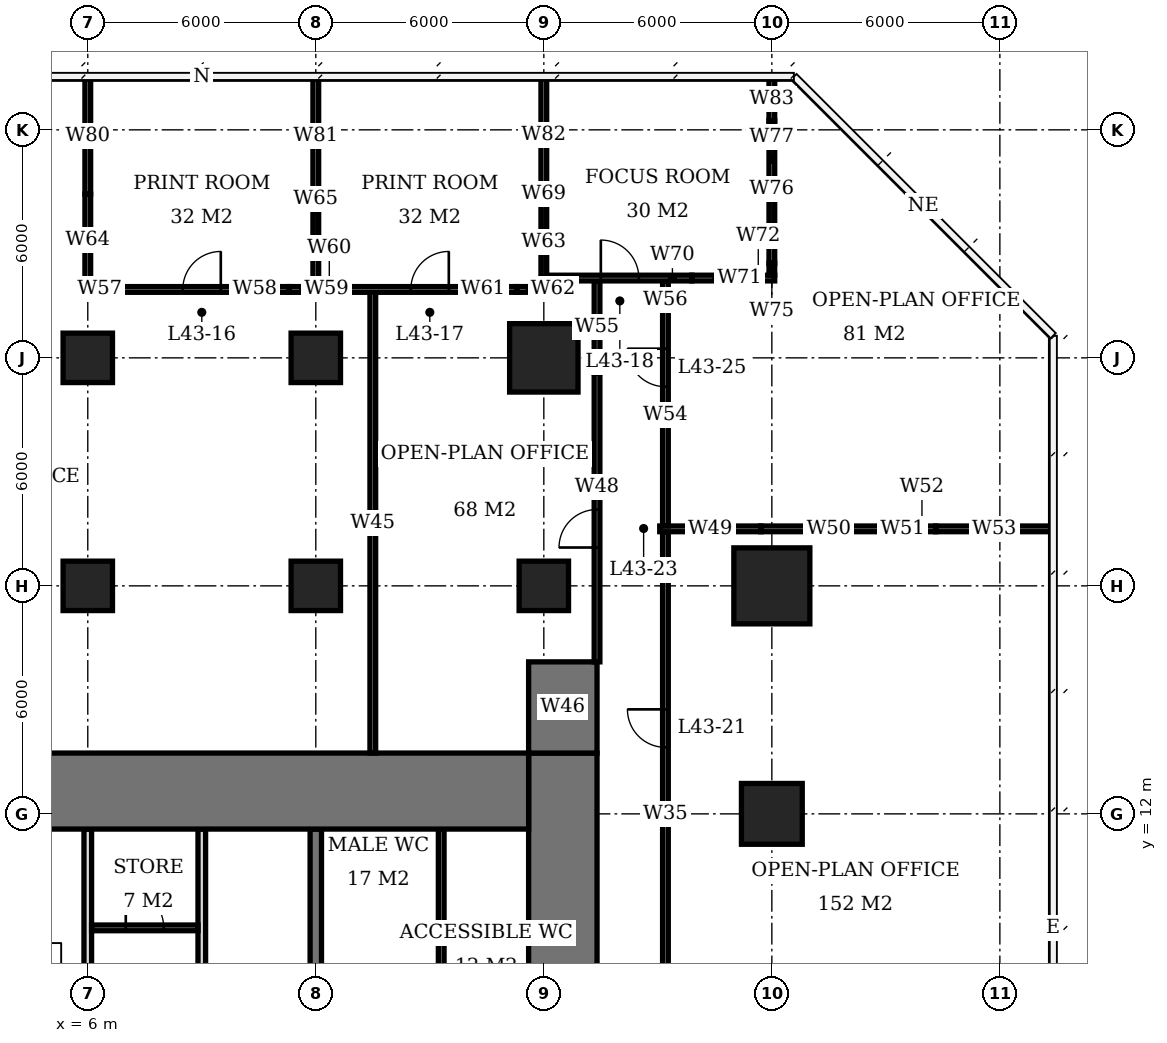
"""IFC4 building model, lengths in metres.
Left out: names, types, materials, properties, quantities, classifications, styles, units other than length and angle.
Written with IfcOpenShell. Run it as: python <this file> out.ifc"""

import sys

from ifc_helpers import new_model, si_unit, direction, frame, frame_2d, origin, origin_2d, place, context, subcontext, project, spatial, rectangle, extrude, element, fill, save


model = new_model("IFC4")
c1 = context("Model", 3, precision=1e-05, world=origin(), true_north=direction((0.0, 1.0)))
c2 = subcontext(c1, "Body", "Model", "MODEL_VIEW")
j1 = project(units=[si_unit("LENGTHUNIT", "METRE"), si_unit("PLANEANGLEUNIT", "RADIAN")], contexts=[c1])
p1 = place(None, origin())
s1 = spatial("IfcSite", under=j1, at=p1, CompositionType="ELEMENT")
p2 = place(p1, origin())
s2 = spatial("IfcBuilding", under=s1, at=p2, CompositionType="ELEMENT")
p3 = place(p2, frame((0.0, 0.0, 177.2)))
s3 = spatial("IfcBuildingStorey", under=s2, at=p3, CompositionType="ELEMENT", Elevation=177.2)
for number, where, z_axis, x_axis in (
    (1, (6.0, 18.0, 0.0), (0.0, 0.0, 1.0), (1.0, 0.0, 0.0)),
    (2, (6.0, 24.0, 0.0), (0.0, 0.0, 1.0), (1.0, 0.0, 0.0)),
    (3, (12.0, 18.0, 0.0), (0.0, 0.0, 1.0), (1.0, 0.0, 0.0)),
    (4, (12.0, 24.0, 0.0), (0.0, 0.0, 1.0), (1.0, 0.0, 0.0)),
    (5, (18.0, 18.0, 0.0), (0.0, 0.0, 1.0), (1.0, 0.0, 0.0)),
):
    element("IfcColumn", number, at=place(p3, frame(where, z_axis=z_axis, x_axis=x_axis)), inside=s3, PredefinedType="COLUMN", context=c2, shape_type="SweptSolid", body=[
        extrude(rectangle(XDim=1.3, YDim=1.3, at=origin_2d()), origin(), (0.0, 0.0, 1.0), 3.9),
    ])
p4 = place(p3, frame((18.0, 24.0, 0.0), z_axis=(0.0, 0.0, 1.0), x_axis=(1.0, 0.0, 0.0)))
e6 = element("IfcColumn", 6, at=p4, inside=s3, PredefinedType="COLUMN", context=c2, shape_type="SweptSolid", body=[
    extrude(rectangle(XDim=1.8, YDim=1.8, at=origin_2d()), origin(), (0.0, 0.0, 1.0), 3.9),
])
p5 = place(p3, frame((24.0, 12.0, 0.0), z_axis=(0.0, 0.0, 1.0), x_axis=(1.0, 0.0, 0.0)))
e7 = element("IfcColumn", 7, at=p5, inside=s3, PredefinedType="COLUMN", context=c2, shape_type="SweptSolid", body=[
    extrude(rectangle(XDim=1.6, YDim=1.6, at=origin_2d()), origin(), (0.0, 0.0, 1.0), 3.9),
])
p6 = place(p3, frame((24.0, 18.0, 0.0), z_axis=(0.0, 0.0, 1.0), x_axis=(1.0, 0.0, 0.0)))
e8 = element("IfcColumn", 8, at=p6, inside=s3, PredefinedType="COLUMN", context=c2, shape_type="SweptSolid", body=[
    extrude(rectangle(XDim=2.0, YDim=2.0, at=origin_2d()), origin(), (0.0, 0.0, 1.0), 3.9),
])
p7 = place(p3, frame((-5.6, 12.6, 0.0), z_axis=(0.0, 0.0, 1.0), x_axis=(1.0, 0.0, 0.0)))
e9 = element("IfcWall", 9, at=p7, inside=s3, PredefinedType="SHEAR", context=c2, shape_type="SweptSolid", body=[
    extrude(rectangle(XDim=23.2, YDim=2.0, at=frame_2d((11.6, 0.0))), origin(), (0.0, 0.0, 1.0), 3.9),
])
p8 = place(p3, frame((18.5, -7.6, 0.0), z_axis=(0.0, 0.0, 1.0), x_axis=(0.0, 1.0, 0.0)))
e10 = element("IfcWall", 10, at=p8, inside=s3, PredefinedType="SHEAR", context=c2, shape_type="SweptSolid", body=[
    extrude(rectangle(XDim=21.2, YDim=1.8, at=frame_2d((10.6, 0.0))), origin(), (0.0, 0.0, 1.0), 3.9),
])
p9 = place(p8, frame((9.2, 0.0, 0.0)))
e11 = element("IfcOpeningElement", 11, at=p9, cuts=e10, PredefinedType="OPENING", context=c2, shape_type="SweptSolid", body=[
    extrude(rectangle(XDim=1.8, YDim=2.4, at=frame_2d((0.9, 1.2))), frame((0.0, 0.91, 0.0), z_axis=(0.0, -1.0, 0.0), x_axis=(1.0, 0.0, 0.0)), (0.0, 0.0, 1.0), 1.82),
])
p10 = place(p3, frame((18.5, 13.6, 0.0), z_axis=(0.0, 0.0, 1.0), x_axis=(0.0, 1.0, 0.0)))
e12 = element("IfcWall", 12, at=p10, inside=s3, PredefinedType="SHEAR", context=c2, shape_type="SweptSolid", body=[
    extrude(rectangle(XDim=2.4, YDim=1.8, at=frame_2d((1.2, 0.0))), origin(), (0.0, 0.0, 1.0), 3.9),
])
p11 = place(p3, frame((12.0, 6.15, 0.0), z_axis=(0.0, 0.0, 1.0), x_axis=(0.0, 1.0, 0.0)))
e13 = element("IfcWall", 13, at=p11, inside=s3, PredefinedType="SHEAR", context=c2, shape_type="SweptSolid", body=[
    extrude(rectangle(XDim=5.45, YDim=0.3, at=frame_2d((2.725, 0.0))), origin(), (0.0, 0.0, 1.0), 3.9),
])
for number, where, z_axis, x_axis in (
    (14, (6.0, 6.15, 0.0), (0.0, 0.0, 1.0), (0.0, 1.0, 0.0)),
    (15, (9.0, 6.15, 0.0), (0.0, 0.0, 1.0), (0.0, 1.0, 0.0)),
):
    element("IfcWall", number, at=place(p3, frame(where, z_axis=z_axis, x_axis=x_axis)), inside=s3, PredefinedType="SOLIDWALL", context=c2, shape_type="SweptSolid", body=[
        extrude(rectangle(XDim=5.45, YDim=0.2, at=frame_2d((2.725, 0.0))), origin(), (0.0, 0.0, 1.0), 3.9),
    ])
p12 = place(p3, frame((15.3, 6.15, 0.0), z_axis=(0.0, 0.0, 1.0), x_axis=(0.0, 1.0, 0.0)))
e16 = element("IfcWall", 16, at=p12, inside=s3, PredefinedType="PLUMBINGWALL", context=c2, shape_type="SweptSolid", body=[
    extrude(rectangle(XDim=5.45, YDim=0.15, at=frame_2d((2.725, 0.0))), origin(), (0.0, 0.0, 1.0), 3.65),
])
p13 = place(p3, frame((6.1, 9.0, 0.0), z_axis=(0.0, 0.0, 1.0), x_axis=(1.0, 0.0, 0.0)))
e17 = element("IfcWall", 17, at=p13, inside=s3, PredefinedType="PARTITIONING", context=c2, shape_type="SweptSolid", body=[
    extrude(rectangle(XDim=2.8, YDim=0.15, at=frame_2d((1.4, 0.0))), origin(), (0.0, 0.0, 1.0), 3.65),
])
p14 = place(p13, frame((0.9, 0.0, 0.0)))
e18 = element("IfcOpeningElement", 18, at=p14, cuts=e17, PredefinedType="OPENING", context=c2, shape_type="SweptSolid", body=[
    extrude(rectangle(XDim=1.0, YDim=2.1, at=frame_2d((0.5, 1.05))), frame((0.0, 0.085, 0.0), z_axis=(0.0, -1.0, 0.0), x_axis=(1.0, 0.0, 0.0)), (0.0, 0.0, 1.0), 0.17),
])
p15 = place(p3, frame((5.925, 25.8, 0.0), z_axis=(0.0, 0.0, 1.0), x_axis=(1.0, 0.0, 0.0)))
e19 = element("IfcWall", 19, at=p15, inside=s3, PredefinedType="PARTITIONING", context=c2, shape_type="SweptSolid", body=[
    extrude(rectangle(XDim=0.785, YDim=0.15, at=frame_2d((0.393, 0.0))), origin(), (0.0, 0.0, 1.0), 2.65),
])
p16 = place(p3, frame((6.71, 25.8, 0.0), z_axis=(0.0, 0.0, 1.0), x_axis=(1.0, 0.0, 0.0)))
e20 = element("IfcWall", 20, at=p16, inside=s3, PredefinedType="PARTITIONING", context=c2, shape_type="SweptSolid", body=[
    extrude(rectangle(XDim=4.58, YDim=0.15, at=frame_2d((2.29, 0.0))), origin(), (0.0, 0.0, 1.0), 3.65),
])
p17 = place(p16, frame((1.79, 0.0, 0.0)))
e21 = element("IfcOpeningElement", 21, at=p17, cuts=e20, PredefinedType="OPENING", context=c2, shape_type="SweptSolid", body=[
    extrude(rectangle(XDim=1.0, YDim=2.1, at=frame_2d((0.5, 1.05))), frame((0.0, 0.085, 0.0), z_axis=(0.0, -1.0, 0.0), x_axis=(1.0, 0.0, 0.0)), (0.0, 0.0, 1.0), 0.17),
])
p18 = place(p3, frame((11.29, 25.8, 0.0), z_axis=(0.0, 0.0, 1.0), x_axis=(1.0, 0.0, 0.0)))
e22 = element("IfcWall", 22, at=p18, inside=s3, PredefinedType="PARTITIONING", context=c2, shape_type="SweptSolid", body=[
    extrude(rectangle(XDim=0.785, YDim=0.15, at=frame_2d((0.393, 0.0))), origin(), (0.0, 0.0, 1.0), 2.65),
])
p19 = place(p3, frame((12.0, 25.8, 0.0), z_axis=(0.0, 0.0, 1.0), x_axis=(1.0, 0.0, 0.0)))
e23 = element("IfcWall", 23, at=p19, inside=s3, PredefinedType="PARTITIONING", context=c2, shape_type="SweptSolid", body=[
    extrude(rectangle(XDim=0.71, YDim=0.15, at=frame_2d((0.355, 0.0))), origin(), (0.0, 0.0, 1.0), 2.65),
])
p20 = place(p3, frame((12.71, 25.8, 0.0), z_axis=(0.0, 0.0, 1.0), x_axis=(1.0, 0.0, 0.0)))
e24 = element("IfcWall", 24, at=p20, inside=s3, PredefinedType="PARTITIONING", context=c2, shape_type="SweptSolid", body=[
    extrude(rectangle(XDim=4.58, YDim=0.15, at=frame_2d((2.29, 0.0))), origin(), (0.0, 0.0, 1.0), 3.65),
])
p21 = place(p20, frame((1.79, 0.0, 0.0)))
e25 = element("IfcOpeningElement", 25, at=p21, cuts=e24, PredefinedType="OPENING", context=c2, shape_type="SweptSolid", body=[
    extrude(rectangle(XDim=1.0, YDim=2.1, at=frame_2d((0.5, 1.05))), frame((0.0, 0.085, 0.0), z_axis=(0.0, -1.0, 0.0), x_axis=(1.0, 0.0, 0.0)), (0.0, 0.0, 1.0), 0.17),
])
p22 = place(p3, frame((17.29, 25.8, 0.0), z_axis=(0.0, 0.0, 1.0), x_axis=(1.0, 0.0, 0.0)))
e26 = element("IfcWall", 26, at=p22, inside=s3, PredefinedType="PARTITIONING", context=c2, shape_type="SweptSolid", body=[
    extrude(rectangle(XDim=0.71, YDim=0.15, at=frame_2d((0.355, 0.0))), origin(), (0.0, 0.0, 1.0), 2.65),
])
p23 = place(p3, frame((18.075, 26.1, 0.0), z_axis=(0.0, 0.0, 1.0), x_axis=(1.0, 0.0, 0.0)))
e27 = element("IfcWall", 27, at=p23, inside=s3, PredefinedType="PARTITIONING", context=c2, shape_type="SweptSolid", body=[
    extrude(rectangle(XDim=3.817, YDim=0.15, at=frame_2d((1.909, 0.0))), origin(), (0.0, 0.0, 1.0), 2.65),
])
p24 = place(p23, frame((1.425, 0.0, 0.0)))
e28 = element("IfcOpeningElement", 28, at=p24, cuts=e27, PredefinedType="OPENING", context=c2, shape_type="SweptSolid", body=[
    extrude(rectangle(XDim=1.0, YDim=2.1, at=frame_2d((0.5, 1.05))), frame((0.0, 0.085, 0.0), z_axis=(0.0, -1.0, 0.0), x_axis=(1.0, 0.0, 0.0)), (0.0, 0.0, 1.0), 0.17),
])
p25 = place(p3, frame((21.892, 26.1, 0.0), z_axis=(0.0, 0.0, 1.0), x_axis=(1.0, 0.0, 0.0)))
e29 = element("IfcWall", 29, at=p25, inside=s3, PredefinedType="PARTITIONING", context=c2, shape_type="SweptSolid", body=[
    extrude(rectangle(XDim=1.318, YDim=0.15, at=frame_2d((0.659, 0.0))), origin(), (0.0, 0.0, 1.0), 3.65),
])
p26 = place(p3, frame((23.21, 26.1, 0.0), z_axis=(0.0, 0.0, 1.0), x_axis=(1.0, 0.0, 0.0)))
e30 = element("IfcWall", 30, at=p26, inside=s3, PredefinedType="PARTITIONING", context=c2, shape_type="SweptSolid", body=[
    extrude(rectangle(XDim=0.865, YDim=0.15, at=frame_2d((0.433, 0.0))), origin(), (0.0, 0.0, 1.0), 2.65),
])
p27 = place(p3, frame((6.0, 25.875, 0.0), z_axis=(0.0, 0.0, 1.0), x_axis=(0.0, 1.0, 0.0)))
e31 = element("IfcWall", 31, at=p27, inside=s3, PredefinedType="PARTITIONING", context=c2, shape_type="SweptSolid", body=[
    extrude(rectangle(XDim=2.435, YDim=0.15, at=frame_2d((1.218, 0.0))), origin(), (0.0, 0.0, 1.0), 2.65),
])
p28 = place(p3, frame((6.0, 28.31, 0.0), z_axis=(0.0, 0.0, 1.0), x_axis=(0.0, 1.0, 0.0)))
e32 = element("IfcWall", 32, at=p28, inside=s3, PredefinedType="PARTITIONING", context=c2, shape_type="SweptSolid", body=[
    extrude(rectangle(XDim=3.04, YDim=0.15, at=frame_2d((1.52, 0.0))), origin(), (0.0, 0.0, 1.0), 3.65),
])
p29 = place(p3, frame((12.0, 25.875, 0.0), z_axis=(0.0, 0.0, 1.0), x_axis=(0.0, 1.0, 0.0)))
e33 = element("IfcWall", 33, at=p29, inside=s3, PredefinedType="PARTITIONING", context=c2, shape_type="SweptSolid", body=[
    extrude(rectangle(XDim=2.435, YDim=0.15, at=frame_2d((1.218, 0.0))), origin(), (0.0, 0.0, 1.0), 2.65),
])
p30 = place(p3, frame((12.0, 28.31, 0.0), z_axis=(0.0, 0.0, 1.0), x_axis=(0.0, 1.0, 0.0)))
e34 = element("IfcWall", 34, at=p30, inside=s3, PredefinedType="PARTITIONING", context=c2, shape_type="SweptSolid", body=[
    extrude(rectangle(XDim=3.04, YDim=0.15, at=frame_2d((1.52, 0.0))), origin(), (0.0, 0.0, 1.0), 3.65),
])
p31 = place(p3, frame((18.0, 25.8, 0.0), z_axis=(0.0, 0.0, 1.0), x_axis=(0.0, 1.0, 0.0)))
e35 = element("IfcWall", 35, at=p31, inside=s3, PredefinedType="PARTITIONING", context=c2, shape_type="SweptSolid", body=[
    extrude(rectangle(XDim=0.3, YDim=0.15, at=frame_2d((0.15, 0.0))), origin(), (0.0, 0.0, 1.0), 2.65),
])
p32 = place(p3, frame((18.0, 26.1, 0.0), z_axis=(0.0, 0.0, 1.0), x_axis=(0.0, 1.0, 0.0)))
e36 = element("IfcWall", 36, at=p32, inside=s3, PredefinedType="PARTITIONING", context=c2, shape_type="SweptSolid", body=[
    extrude(rectangle(XDim=2.21, YDim=0.15, at=frame_2d((1.105, 0.0))), origin(), (0.0, 0.0, 1.0), 2.65),
])
p33 = place(p3, frame((18.0, 28.31, 0.0), z_axis=(0.0, 0.0, 1.0), x_axis=(0.0, 1.0, 0.0)))
e37 = element("IfcWall", 37, at=p33, inside=s3, PredefinedType="PARTITIONING", context=c2, shape_type="SweptSolid", body=[
    extrude(rectangle(XDim=3.09, YDim=0.15, at=frame_2d((1.545, 0.0))), origin(), (0.0, 0.0, 1.0), 3.65),
])
p34 = place(p3, frame((24.0, 26.175, 0.0), z_axis=(0.0, 0.0, 1.0), x_axis=(0.0, 1.0, 0.0)))
e38 = element("IfcWall", 38, at=p34, inside=s3, PredefinedType="PARTITIONING", context=c2, shape_type="SweptSolid", body=[
    extrude(rectangle(XDim=0.315, YDim=0.15, at=frame_2d((0.157, 0.0))), origin(), (0.0, 0.0, 1.0), 2.65),
])
p35 = place(p3, frame((24.0, 26.49, 0.0), z_axis=(0.0, 0.0, 1.0), x_axis=(0.0, 1.0, 0.0)))
e39 = element("IfcWall", 39, at=p35, inside=s3, PredefinedType="PARTITIONING", context=c2, shape_type="SweptSolid", body=[
    extrude(rectangle(XDim=1.718, YDim=0.15, at=frame_2d((0.859, 0.0))), origin(), (0.0, 0.0, 1.0), 3.65),
])
p36 = place(p3, frame((24.0, 28.208, 0.0), z_axis=(0.0, 0.0, 1.0), x_axis=(0.0, 1.0, 0.0)))
e40 = element("IfcWall", 40, at=p36, inside=s3, PredefinedType="PARTITIONING", context=c2, shape_type="SweptSolid", body=[
    extrude(rectangle(XDim=2.029, YDim=0.15, at=frame_2d((1.015, 0.0))), origin(), (0.0, 0.0, 1.0), 2.65),
])
p37 = place(p3, frame((24.0, 30.237, 0.0), z_axis=(0.0, 0.0, 1.0), x_axis=(0.0, 1.0, 0.0)))
e41 = element("IfcWall", 41, at=p37, inside=s3, PredefinedType="PARTITIONING", context=c2, shape_type="SweptSolid", body=[
    extrude(rectangle(XDim=1.163, YDim=0.15, at=frame_2d((0.582, 0.0))), origin(), (0.0, 0.0, 1.0), 3.65),
])
p38 = place(p3, frame((13.5, 13.6, 0.0), z_axis=(0.0, 0.0, 1.0), x_axis=(0.0, 1.0, 0.0)))
e42 = element("IfcWall", 42, at=p38, inside=s3, PredefinedType="PARTITIONING", context=c2, shape_type="SweptSolid", body=[
    extrude(rectangle(XDim=12.125, YDim=0.15, at=frame_2d((6.062, 0.0))), origin(), (0.0, 0.0, 1.0), 3.65),
])
p39 = place(p3, frame((19.4, 16.0, 0.0), z_axis=(0.0, 0.0, 1.0), x_axis=(0.0, 1.0, 0.0)))
e43 = element("IfcWall", 43, at=p39, inside=s3, PredefinedType="PARTITIONING", context=c2, shape_type="SweptSolid", body=[
    extrude(rectangle(XDim=7.608, YDim=0.15, at=frame_2d((3.804, 0.0))), origin(), (0.0, 0.0, 1.0), 3.65),
])
p40 = place(p39, frame((3.009, 0.0, 0.0)))
e44 = element("IfcOpeningElement", 44, at=p40, cuts=e43, PredefinedType="OPENING", context=c2, shape_type="SweptSolid", body=[
    extrude(rectangle(XDim=1.0, YDim=2.1, at=frame_2d((0.5, 1.05))), frame((0.0, 0.085, 0.0), z_axis=(0.0, -1.0, 0.0), x_axis=(1.0, 0.0, 0.0)), (0.0, 0.0, 1.0), 0.17),
])
p41 = place(p3, frame((19.4, 23.608, 0.0), z_axis=(0.0, 0.0, 1.0), x_axis=(0.0, 1.0, 0.0)))
e45 = element("IfcWall", 45, at=p41, inside=s3, PredefinedType="PARTITIONING", context=c2, shape_type="SweptSolid", body=[
    extrude(rectangle(XDim=2.417, YDim=0.15, at=frame_2d((1.208, 0.0))), origin(), (0.0, 0.0, 1.0), 2.65),
])
p42 = place(p3, frame((21.2, 4.575, 0.0), z_axis=(0.0, 0.0, 1.0), x_axis=(0.0, 1.0, 0.0)))
e46 = element("IfcWall", 46, at=p42, inside=s3, PredefinedType="PARTITIONING", context=c2, shape_type="SweptSolid", body=[
    extrude(rectangle(XDim=14.85, YDim=0.15, at=frame_2d((7.425, 0.0))), origin(), (0.0, 0.0, 1.0), 3.65),
])
p43 = place(p42, frame((9.175, 0.0, 0.0)))
e47 = element("IfcOpeningElement", 47, at=p43, cuts=e46, PredefinedType="OPENING", context=c2, shape_type="SweptSolid", body=[
    extrude(rectangle(XDim=1.0, YDim=2.1, at=frame_2d((0.5, 1.05))), frame((0.0, 0.085, 0.0), z_axis=(0.0, -1.0, 0.0), x_axis=(1.0, 0.0, 0.0)), (0.0, 0.0, 1.0), 0.17),
])
p44 = place(p3, frame((21.2, 19.575, 0.0), z_axis=(0.0, 0.0, 1.0), x_axis=(0.0, 1.0, 0.0)))
e48 = element("IfcWall", 48, at=p44, inside=s3, PredefinedType="PARTITIONING", context=c2, shape_type="SweptSolid", body=[
    extrude(rectangle(XDim=5.833, YDim=0.15, at=frame_2d((2.917, 0.0))), origin(), (0.0, 0.0, 1.0), 3.65),
])
p45 = place(p44, frame((3.666, 0.0, 0.0)))
e49 = element("IfcOpeningElement", 49, at=p45, cuts=e48, PredefinedType="OPENING", context=c2, shape_type="SweptSolid", body=[
    extrude(rectangle(XDim=1.0, YDim=2.1, at=frame_2d((0.5, 1.05))), frame((0.0, 0.085, 0.0), z_axis=(0.0, -1.0, 0.0), x_axis=(1.0, 0.0, 0.0)), (0.0, 0.0, 1.0), 0.17),
])
p46 = place(p3, frame((21.2, 25.408, 0.0), z_axis=(0.0, 0.0, 1.0), x_axis=(0.0, 1.0, 0.0)))
e50 = element("IfcWall", 50, at=p46, inside=s3, PredefinedType="PARTITIONING", context=c2, shape_type="SweptSolid", body=[
    extrude(rectangle(XDim=0.617, YDim=0.15, at=frame_2d((0.309, 0.0))), origin(), (0.0, 0.0, 1.0), 2.65),
])
p47 = place(p3, frame((21.05, 19.5, 0.0), z_axis=(0.0, 0.0, 1.0), x_axis=(1.0, 0.0, 0.0)))
e51 = element("IfcWall", 51, at=p47, inside=s3, PredefinedType="PARTITIONING", context=c2, shape_type="SweptSolid", body=[
    extrude(rectangle(XDim=2.658, YDim=0.15, at=frame_2d((1.329, 0.0))), origin(), (0.0, 0.0, 1.0), 3.65),
])
p48 = place(p3, frame((23.708, 19.5, 0.0), z_axis=(0.0, 0.0, 1.0), x_axis=(1.0, 0.0, 0.0)))
e52 = element("IfcWall", 52, at=p48, inside=s3, PredefinedType="PARTITIONING", context=c2, shape_type="SweptSolid", body=[
    extrude(rectangle(XDim=3.584, YDim=0.15, at=frame_2d((1.792, 0.0))), origin(), (0.0, 0.0, 1.0), 2.65),
])
p49 = place(p3, frame((27.292, 19.5, 0.0), z_axis=(0.0, 0.0, 1.0), x_axis=(1.0, 0.0, 0.0)))
e53 = element("IfcWall", 53, at=p49, inside=s3, PredefinedType="PARTITIONING", context=c2, shape_type="SweptSolid", body=[
    extrude(rectangle(XDim=0.298, YDim=0.15, at=frame_2d((0.149, 0.0))), origin(), (0.0, 0.0, 1.0), 3.65),
])
p50 = place(p3, frame((27.59, 19.5, 0.0), z_axis=(0.0, 0.0, 1.0), x_axis=(1.0, 0.0, 0.0)))
e54 = element("IfcWall", 54, at=p50, inside=s3, PredefinedType="PARTITIONING", context=c2, shape_type="SweptSolid", body=[
    extrude(rectangle(XDim=0.72, YDim=0.15, at=frame_2d((0.36, 0.0))), origin(), (0.0, 0.0, 1.0), 2.65),
])
p51 = place(p3, frame((28.31, 19.5, 0.0), z_axis=(0.0, 0.0, 1.0), x_axis=(1.0, 0.0, 0.0)))
e55 = element("IfcWall", 55, at=p51, inside=s3, PredefinedType="PARTITIONING", context=c2, shape_type="SweptSolid", body=[
    extrude(rectangle(XDim=3.09, YDim=0.15, at=frame_2d((1.545, 0.0))), origin(), (0.0, 0.0, 1.0), 3.65),
])
p52 = place(p14, origin())
e56 = element("IfcDoor", 56, at=p52, inside=s3, OperationType="SINGLE_SWING_LEFT", PredefinedType="DOOR", context=c2, shape_type="SweptSolid", body=[
    extrude(rectangle(XDim=1.0, YDim=2.1, at=frame_2d((0.5, 1.05))), frame((0.0, 0.025, 0.0), z_axis=(0.0, -1.0, 0.0), x_axis=(1.0, 0.0, 0.0)), (0.0, 0.0, 1.0), 0.05),
])
fill(e18, e56)
p53 = place(p17, origin())
e57 = element("IfcDoor", 57, at=p53, inside=s3, OperationType="SINGLE_SWING_RIGHT", PredefinedType="DOOR", context=c2, shape_type="SweptSolid", body=[
    extrude(rectangle(XDim=1.0, YDim=2.1, at=frame_2d((0.5, 1.05))), frame((0.0, 0.025, 0.0), z_axis=(0.0, -1.0, 0.0), x_axis=(1.0, 0.0, 0.0)), (0.0, 0.0, 1.0), 0.05),
])
fill(e21, e57)
p54 = place(p21, origin())
e58 = element("IfcDoor", 58, at=p54, inside=s3, OperationType="SINGLE_SWING_RIGHT", PredefinedType="DOOR", context=c2, shape_type="SweptSolid", body=[
    extrude(rectangle(XDim=1.0, YDim=2.1, at=frame_2d((0.5, 1.05))), frame((0.0, 0.025, 0.0), z_axis=(0.0, -1.0, 0.0), x_axis=(1.0, 0.0, 0.0)), (0.0, 0.0, 1.0), 0.05),
])
fill(e25, e58)
p55 = place(p24, origin())
e59 = element("IfcDoor", 59, at=p55, inside=s3, OperationType="SINGLE_SWING_LEFT", PredefinedType="DOOR", context=c2, shape_type="SweptSolid", body=[
    extrude(rectangle(XDim=1.0, YDim=2.1, at=frame_2d((0.5, 1.05))), frame((0.0, 0.025, 0.0), z_axis=(0.0, -1.0, 0.0), x_axis=(1.0, 0.0, 0.0)), (0.0, 0.0, 1.0), 0.05),
])
fill(e28, e59)
p56 = place(p43, origin())
e60 = element("IfcDoor", 60, at=p56, inside=s3, OperationType="SINGLE_SWING_RIGHT", PredefinedType="DOOR", context=c2, shape_type="SweptSolid", body=[
    extrude(rectangle(XDim=1.0, YDim=2.1, at=frame_2d((0.5, 1.05))), frame((0.0, 0.025, 0.0), z_axis=(0.0, -1.0, 0.0), x_axis=(1.0, 0.0, 0.0)), (0.0, 0.0, 1.0), 0.05),
])
fill(e47, e60)
p57 = place(p40, origin())
e61 = element("IfcDoor", 61, at=p57, inside=s3, OperationType="SINGLE_SWING_LEFT", PredefinedType="DOOR", context=c2, shape_type="SweptSolid", body=[
    extrude(rectangle(XDim=1.0, YDim=2.1, at=frame_2d((0.5, 1.05))), frame((0.0, 0.025, 0.0), z_axis=(0.0, -1.0, 0.0), x_axis=(1.0, 0.0, 0.0)), (0.0, 0.0, 1.0), 0.05),
])
fill(e44, e61)
p58 = place(p45, origin())
e62 = element("IfcDoor", 62, at=p58, inside=s3, OperationType="SINGLE_SWING_RIGHT", PredefinedType="DOOR", context=c2, shape_type="SweptSolid", body=[
    extrude(rectangle(XDim=1.0, YDim=2.1, at=frame_2d((0.5, 1.05))), frame((0.0, 0.025, 0.0), z_axis=(0.0, -1.0, 0.0), x_axis=(1.0, 0.0, 0.0)), (0.0, 0.0, 1.0), 0.05),
])
fill(e49, e62)
save(model, sys.argv[1])
